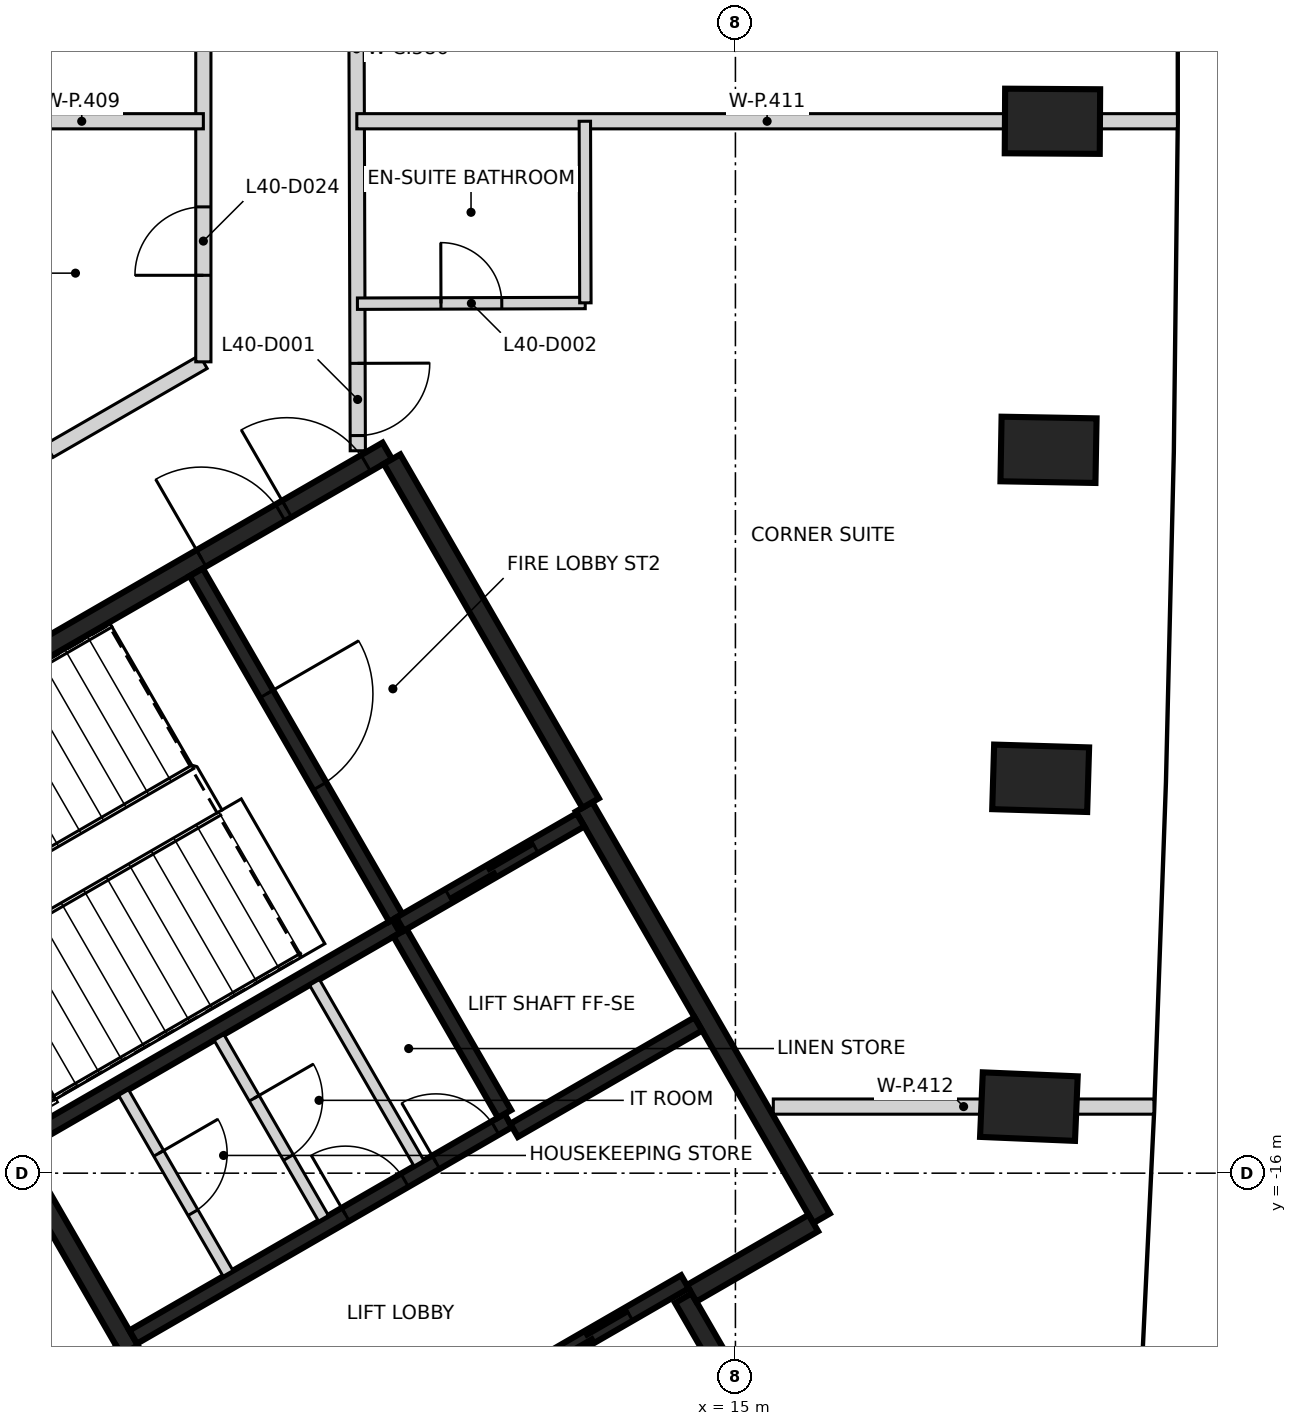
"""IFC4 building model, lengths in metres.
Left out: names, types, materials, properties, quantities, classifications, styles, units other than length and angle.
Written with IfcOpenShell. Run it as: python <this file> out.ifc"""

import sys

from ifc_helpers import new_model, si_unit, direction, frame, frame_2d, origin, origin_2d, place, context, subcontext, project, spatial, rectangle, extrude, element, fill, save


model = new_model("IFC4")
c1 = context("Model", 3, precision=1e-05, world=origin(), true_north=direction((0.0, 1.0)))
c2 = subcontext(c1, "Body", "Model", "MODEL_VIEW")
j1 = project(units=[si_unit("LENGTHUNIT", "METRE"), si_unit("PLANEANGLEUNIT", "RADIAN")], contexts=[c1])
p1 = place(None, origin())
s1 = spatial("IfcSite", under=j1, at=p1, CompositionType="ELEMENT")
p2 = place(p1, origin())
s2 = spatial("IfcBuilding", under=s1, at=p2, CompositionType="ELEMENT")
p3 = place(p2, frame((0.0, 0.0, 161.2)))
s3 = spatial("IfcBuildingStorey", under=s2, at=p3, CompositionType="ELEMENT", Elevation=161.2)
for number, where, z_axis, x_axis in (
    (1, (18.861, -15.124, -0.4), (0.0, 0.0, 1.0), (-0.999, 0.042, 0.0)),
    (2, (19.016, -10.805, -0.4), (0.0, 0.0, 1.0), (-1.0, 0.03, 0.0)),
    (3, (19.119, -6.484, -0.4), (0.0, 0.0, 1.0), (-1.0, 0.018, 0.0)),
    (4, (19.171, -2.161, -0.4), (0.0, 0.0, 1.0), (-1.0, 0.006, 0.0)),
):
    element("IfcColumn", number, at=place(p3, frame(where, z_axis=z_axis, x_axis=x_axis)), inside=s3, PredefinedType="COLUMN", context=c2, shape_type="SweptSolid", body=[
        extrude(rectangle(XDim=1.25, YDim=0.85, at=origin_2d()), origin(), (0.0, 0.0, 1.0), 2.884),
    ])
p4 = place(p3, frame((0.417, -12.273, 0.0), z_axis=(0.0, 0.0, 1.0), x_axis=(0.866021906294, 0.500006057782, 0.0)))
e5 = element("IfcWall", 5, at=p4, inside=s3, PredefinedType="SHEAR", context=c2, shape_type="SweptSolid", body=[
    extrude(rectangle(XDim=11.55, YDim=0.25, at=frame_2d((5.775, 0.0))), origin(), (0.0, 0.0, 1.0), 3.2),
])
p5 = place(p4, frame((10.025, 0.0, 0.0)))
e6 = element("IfcOpeningElement", 6, at=p5, cuts=e5, PredefinedType="OPENING", context=c2, shape_type="SweptSolid", body=[
    extrude(rectangle(XDim=1.2, YDim=2.1, at=frame_2d((0.6, 1.05))), frame((0.0, 0.135, 0.0), z_axis=(0.0, -1.0, 0.0), x_axis=(1.0, 0.0, 0.0)), (0.0, 0.0, 1.0), 0.27),
])
p6 = place(p4, frame((8.725, 0.0, 0.0)))
e7 = element("IfcOpeningElement", 7, at=p6, cuts=e5, PredefinedType="OPENING", context=c2, shape_type="SweptSolid", body=[
    extrude(rectangle(XDim=1.2, YDim=2.1, at=frame_2d((0.6, 1.05))), frame((0.0, 0.135, 0.0), z_axis=(0.0, -1.0, 0.0), x_axis=(1.0, 0.0, 0.0)), (0.0, 0.0, 1.0), 0.27),
])
p7 = place(p3, frame((13.008, -11.181, 0.0), z_axis=(0.0, 0.0, 1.0), x_axis=(0.500004234368, -0.866022959057, 0.0)))
e8 = element("IfcWall", 8, at=p7, inside=s3, PredefinedType="SHEAR", context=c2, shape_type="SweptSolid", body=[
    extrude(rectangle(XDim=6.25, YDim=0.25, at=frame_2d((3.125, 0.0))), origin(), (0.0, 0.0, 1.0), 3.2),
])
p8 = place(p3, frame((10.483, -6.606, 0.0), z_axis=(0.0, 0.0, 1.0), x_axis=(0.49999885962, -0.866026062182, 0.0)))
e9 = element("IfcWall", 9, at=p8, inside=s3, PredefinedType="SHEAR", context=c2, shape_type="SweptSolid", body=[
    extrude(rectangle(XDim=5.225, YDim=0.25, at=frame_2d((2.612, 0.0))), origin(), (0.0, 0.0, 1.0), 3.2),
])
p9 = place(p3, frame((7.031, -18.327, 0.0), z_axis=(0.0, 0.0, 1.0), x_axis=(-0.499971222258, 0.866042017984, 0.0)))
e10 = element("IfcWall", 10, at=p9, inside=s3, PredefinedType="SHEAR", context=c2, shape_type="SweptSolid", body=[
    extrude(rectangle(XDim=3.2, YDim=0.25, at=frame_2d((1.6, 0.0))), origin(), (0.0, 0.0, 1.0), 3.2),
])
p10 = place(p3, frame((14.315, -17.644, 0.0), z_axis=(0.0, 0.0, 1.0), x_axis=(0.500023226632, -0.866011993467, 0.0)))
e11 = element("IfcWall", 11, at=p10, inside=s3, PredefinedType="SHEAR", context=c2, shape_type="SweptSolid", body=[
    extrude(rectangle(XDim=2.974, YDim=0.25, at=frame_2d((1.487, 0.0))), origin(), (0.0, 0.0, 1.0), 3.2),
])
p11 = place(p3, frame((4.414, -16.276, 0.0), z_axis=(0.0, 0.0, 1.0), x_axis=(0.500003324108, -0.866023484601, 0.0)))
e12 = element("IfcWall", 12, at=p11, inside=s3, PredefinedType="SHEAR", context=c2, shape_type="SweptSolid", body=[
    extrude(rectangle(XDim=3.085, YDim=0.25, at=frame_2d((1.542, 0.0))), origin(), (0.0, 0.0, 1.0), 3.2),
])
p12 = place(p3, frame((16.025, -16.656, 0.0), z_axis=(0.0, 0.0, 1.0), x_axis=(-0.866016279763, -0.500015802937, 0.0)))
e13 = element("IfcWall", 13, at=p12, inside=s3, PredefinedType="SHEAR", context=c2, shape_type="SweptSolid", body=[
    extrude(rectangle(XDim=1.849, YDim=0.25, at=frame_2d((0.925, 0.0))), origin(), (0.0, 0.0, 1.0), 3.2),
])
p13 = place(p3, frame((6.065, -18.885, 0.0), z_axis=(0.0, 0.0, 1.0), x_axis=(0.866017078145, 0.500014420154, 0.0)))
e14 = element("IfcWall", 14, at=p13, inside=s3, PredefinedType="SHEAR", context=c2, shape_type="SweptSolid", body=[
    extrude(rectangle(XDim=0.989, YDim=0.25, at=frame_2d((0.495, 0.0))), origin(), (0.0, 0.0, 1.0), 3.2),
])
p14 = place(p3, frame((9.052, -20.48, 0.0), z_axis=(0.0, 0.0, 1.0), x_axis=(0.866030299012, 0.499991521122, 0.0)))
e15 = element("IfcWall", 15, at=p14, inside=s3, PredefinedType="SHEAR", context=c2, shape_type="SweptSolid", body=[
    extrude(rectangle(XDim=6.1, YDim=0.2, at=frame_2d((3.05, 0.0))), origin(), (0.0, 0.0, 1.0), 3.2),
])
p15 = place(p14, frame((1.0, 0.0, 0.0)))
e16 = element("IfcOpeningElement", 16, at=p15, cuts=e15, PredefinedType="OPENING", context=c2, shape_type="SweptSolid", body=[
    extrude(rectangle(XDim=1.2, YDim=2.1, at=frame_2d((0.6, 1.05))), frame((0.0, 0.11, 0.0), z_axis=(0.0, -1.0, 0.0), x_axis=(1.0, 0.0, 0.0)), (0.0, 0.0, 1.0), 0.22),
])
p16 = place(p14, frame((4.05, 0.0, 0.0)))
e17 = element("IfcOpeningElement", 17, at=p16, cuts=e15, PredefinedType="OPENING", context=c2, shape_type="SweptSolid", body=[
    extrude(rectangle(XDim=1.2, YDim=2.1, at=frame_2d((0.6, 1.05))), frame((0.0, 0.11, 0.0), z_axis=(0.0, -1.0, 0.0), x_axis=(1.0, 0.0, 0.0)), (0.0, 0.0, 1.0), 0.22),
])
p17 = place(p3, frame((10.538, -12.752, 0.0), z_axis=(0.0, 0.0, 1.0), x_axis=(-0.866038630372, -0.499977090179, 0.0)))
e18 = element("IfcWall", 18, at=p17, inside=s3, PredefinedType="SHEAR", context=c2, shape_type="SweptSolid", body=[
    extrude(rectangle(XDim=5.699, YDim=0.2, at=frame_2d((2.85, 0.0))), origin(), (0.0, 0.0, 1.0), 3.2),
])
p18 = place(p3, frame((7.077, -18.156, 0.0), z_axis=(0.0, 0.0, 1.0), x_axis=(0.866038630372, 0.499977090179, 0.0)))
e19 = element("IfcWall", 19, at=p18, inside=s3, PredefinedType="SHEAR", context=c2, shape_type="SweptSolid", body=[
    extrude(rectangle(XDim=5.699, YDim=0.2, at=frame_2d((2.85, 0.0))), origin(), (0.0, 0.0, 1.0), 3.2),
])
p19 = place(p18, frame((3.224, 0.0, 0.0)))
e20 = element("IfcOpeningElement", 20, at=p19, cuts=e19, PredefinedType="OPENING", context=c2, shape_type="SweptSolid", body=[
    extrude(rectangle(XDim=0.9, YDim=2.1, at=frame_2d((0.45, 1.05))), frame((0.0, 0.11, 0.0), z_axis=(0.0, -1.0, 0.0), x_axis=(1.0, 0.0, 0.0)), (0.0, 0.0, 1.0), 0.22),
])
p20 = place(p18, frame((4.599, 0.0, 0.0)))
e21 = element("IfcOpeningElement", 21, at=p20, cuts=e19, PredefinedType="OPENING", context=c2, shape_type="SweptSolid", body=[
    extrude(rectangle(XDim=0.9, YDim=2.1, at=frame_2d((0.45, 1.05))), frame((0.0, 0.11, 0.0), z_axis=(0.0, -1.0, 0.0), x_axis=(1.0, 0.0, 0.0)), (0.0, 0.0, 1.0), 0.22),
])
p21 = place(p3, frame((7.906, -8.094, 0.0), z_axis=(0.0, 0.0, 1.0), x_axis=(0.500024287448, -0.866011380966, 0.0)))
e22 = element("IfcWall", 22, at=p21, inside=s3, PredefinedType="SHEAR", context=c2, shape_type="SweptSolid", body=[
    extrude(rectangle(XDim=5.251, YDim=0.2, at=frame_2d((2.625, 0.0))), origin(), (0.0, 0.0, 1.0), 3.2),
])
p22 = place(p21, frame((1.849, 0.0, 0.0)))
e23 = element("IfcOpeningElement", 23, at=p22, cuts=e22, PredefinedType="OPENING", context=c2, shape_type="SweptSolid", body=[
    extrude(rectangle(XDim=1.4, YDim=2.1, at=frame_2d((0.7, 1.05))), frame((0.0, 0.11, 0.0), z_axis=(0.0, -1.0, 0.0), x_axis=(1.0, 0.0, 0.0)), (0.0, 0.0, 1.0), 0.22),
])
p23 = place(p3, frame((11.963, -15.22, 0.0), z_axis=(0.0, 0.0, 1.0), x_axis=(-0.500034990121, 0.866005201286, 0.0)))
e24 = element("IfcWall", 24, at=p23, inside=s3, PredefinedType="SHEAR", context=c2, shape_type="SweptSolid", body=[
    extrude(rectangle(XDim=2.75, YDim=0.2, at=frame_2d((1.375, 0.0))), origin(), (0.0, 0.0, 1.0), 3.2),
])
p24 = place(p3, frame((10.587, -12.723, 0.0), z_axis=(0.0, 0.0, 1.0), x_axis=(0.866037306777, 0.499979382845, 0.0)))
e25 = element("IfcWall", 25, at=p24, inside=s3, PredefinedType="SHEAR", context=c2, shape_type="SweptSolid", body=[
    extrude(rectangle(XDim=2.742, YDim=0.2, at=frame_2d((1.371, 0.0))), origin(), (0.0, 0.0, 1.0), 3.2),
])
p25 = place(p24, frame((0.743, 0.0, 0.0)))
e26 = element("IfcOpeningElement", 26, at=p25, cuts=e25, PredefinedType="OPENING", context=c2, shape_type="SweptSolid", body=[
    extrude(rectangle(XDim=1.3, YDim=2.1, at=frame_2d((0.65, 1.05))), frame((0.0, 0.11, 0.0), z_axis=(0.0, -1.0, 0.0), x_axis=(1.0, 0.0, 0.0)), (0.0, 0.0, 1.0), 0.22),
])
p26 = place(p3, frame((14.512, -14.037, 0.0), z_axis=(0.0, 0.0, 1.0), x_axis=(-0.866044696403, -0.499966582715, 0.0)))
e27 = element("IfcWall", 27, at=p26, inside=s3, PredefinedType="SHEAR", context=c2, shape_type="SweptSolid", body=[
    extrude(rectangle(XDim=2.799, YDim=0.2, at=frame_2d((1.399, 0.0))), origin(), (0.0, 0.0, 1.0), 3.2),
])
p27 = place(p3, frame((8.207, -14.214, 0.0), z_axis=(0.0, 0.0, 1.0), x_axis=(0.50002746344, -0.86600954718, 0.0)))
e28 = element("IfcWall", 28, at=p27, inside=s3, PredefinedType="PARTITIONING", context=c2, shape_type="SweptSolid", body=[
    extrude(rectangle(XDim=2.748, YDim=0.15, at=frame_2d((1.374, 0.0))), origin(), (0.0, 0.0, 1.0), 3.2),
])
p28 = place(p27, frame((0.924, 0.0, 0.0)))
e29 = element("IfcOpeningElement", 29, at=p28, cuts=e28, PredefinedType="OPENING", context=c2, shape_type="SweptSolid", body=[
    extrude(rectangle(XDim=0.9, YDim=2.1, at=frame_2d((0.45, 1.05))), frame((0.0, 0.085, 0.0), z_axis=(0.0, -1.0, 0.0), x_axis=(1.0, 0.0, 0.0)), (0.0, 0.0, 1.0), 0.17),
])
p29 = place(p3, frame((9.462, -13.489, 0.0), z_axis=(0.0, 0.0, 1.0), x_axis=(0.499988999718, -0.866031754707, 0.0)))
e30 = element("IfcWall", 30, at=p29, inside=s3, PredefinedType="PARTITIONING", context=c2, shape_type="SweptSolid", body=[
    extrude(rectangle(XDim=2.749, YDim=0.15, at=frame_2d((1.374, 0.0))), origin(), (0.0, 0.0, 1.0), 3.2),
])
p30 = place(p3, frame((6.951, -14.939, 0.0), z_axis=(0.0, 0.0, 1.0), x_axis=(0.499988999718, -0.866031754707, 0.0)))
e31 = element("IfcWall", 31, at=p30, inside=s3, PredefinedType="PARTITIONING", context=c2, shape_type="SweptSolid", body=[
    extrude(rectangle(XDim=2.749, YDim=0.15, at=frame_2d((1.374, 0.0))), origin(), (0.0, 0.0, 1.0), 3.2),
])
p31 = place(p30, frame((0.924, 0.0, 0.0)))
e32 = element("IfcOpeningElement", 32, at=p31, cuts=e31, PredefinedType="OPENING", context=c2, shape_type="SweptSolid", body=[
    extrude(rectangle(XDim=0.9, YDim=2.1, at=frame_2d((0.45, 1.05))), frame((0.0, 0.085, 0.0), z_axis=(0.0, -1.0, 0.0), x_axis=(1.0, 0.0, 0.0)), (0.0, 0.0, 1.0), 0.17),
])
p32 = place(p3, frame((5.973, -6.496, 0.0), z_axis=(0.0, 0.0, 1.0), x_axis=(0.866175166619, 0.4997405134, 0.0)))
e33 = element("IfcWall", 33, at=p32, inside=s3, PredefinedType="PARTITIONING", context=c2, shape_type="SweptSolid", body=[
    extrude(rectangle(XDim=2.341, YDim=0.2, at=frame_2d((1.17, 0.0))), origin(), (0.0, 0.0, 1.0), 3.2),
])
p33 = place(p3, frame((8.0, -5.326, 0.0), z_axis=(0.0, 0.0, 1.0), x_axis=(0.0, 1.0, 0.0)))
e34 = element("IfcWall", 34, at=p33, inside=s3, PredefinedType="PARTITIONING", context=c2, shape_type="SweptSolid", body=[
    extrude(rectangle(XDim=10.652, YDim=0.2, at=frame_2d((5.326, 0.0))), origin(), (0.0, 0.0, 1.0), 3.2),
])
p34 = place(p33, frame((1.138, 0.0, 0.0)))
e35 = element("IfcOpeningElement", 35, at=p34, cuts=e34, PredefinedType="OPENING", context=c2, shape_type="SweptSolid", body=[
    extrude(rectangle(XDim=0.9, YDim=2.1, at=frame_2d((0.45, 1.05))), frame((0.0, 0.11, 0.0), z_axis=(0.0, -1.0, 0.0), x_axis=(1.0, 0.0, 0.0)), (0.0, 0.0, 1.0), 0.22),
])
p35 = place(p33, frame((4.876, 0.0, 0.0)))
e36 = element("IfcOpeningElement", 36, at=p35, cuts=e34, PredefinedType="OPENING", context=c2, shape_type="SweptSolid", body=[
    extrude(rectangle(XDim=0.9, YDim=2.1, at=frame_2d((0.45, 1.05))), frame((0.0, 0.11, 0.0), z_axis=(0.0, -1.0, 0.0), x_axis=(1.0, 0.0, 0.0)), (0.0, 0.0, 1.0), 0.22),
])
p36 = place(p33, frame((8.614, 0.0, 0.0)))
e37 = element("IfcOpeningElement", 37, at=p36, cuts=e34, PredefinedType="OPENING", context=c2, shape_type="SweptSolid", body=[
    extrude(rectangle(XDim=0.9, YDim=2.1, at=frame_2d((0.45, 1.05))), frame((0.0, 0.11, 0.0), z_axis=(0.0, -1.0, 0.0), x_axis=(1.0, 0.0, 0.0)), (0.0, 0.0, 1.0), 0.22),
])
p37 = place(p3, frame((10.0, 4.078, 0.0), z_axis=(0.0, 0.0, 1.0), x_axis=(0.003070798941, -0.999995285086, 0.0)))
e38 = element("IfcWall", 38, at=p37, inside=s3, PredefinedType="PARTITIONING", context=c2, shape_type="SweptSolid", body=[
    extrude(rectangle(XDim=10.574, YDim=0.2, at=frame_2d((5.287, 0.0))), origin(), (0.0, 0.0, 1.0), 3.2),
])
p38 = place(p37, frame((9.424, 0.0, 0.0)))
e39 = element("IfcOpeningElement", 39, at=p38, cuts=e38, PredefinedType="OPENING", context=c2, shape_type="SweptSolid", body=[
    extrude(rectangle(XDim=0.95, YDim=2.1, at=frame_2d((0.475, 1.05))), frame((0.0, 0.11, 0.0), z_axis=(0.0, -1.0, 0.0), x_axis=(1.0, 0.0, 0.0)), (0.0, 0.0, 1.0), 0.22),
])
p39 = place(p37, frame((2.651, 0.0, 0.0)))
e40 = element("IfcOpeningElement", 40, at=p39, cuts=e38, PredefinedType="OPENING", context=c2, shape_type="SweptSolid", body=[
    extrude(rectangle(XDim=0.95, YDim=2.1, at=frame_2d((0.475, 1.05))), frame((0.0, 0.11, 0.0), z_axis=(0.0, -1.0, 0.0), x_axis=(1.0, 0.0, 0.0)), (0.0, 0.0, 1.0), 0.22),
])
p40 = place(p3, frame((4.8, -2.161, 0.0), z_axis=(0.0, 0.0, 1.0), x_axis=(1.0, 0.0, 0.0)))
e41 = element("IfcWall", 41, at=p40, inside=s3, PredefinedType="PARTITIONING", context=c2, shape_type="SweptSolid", body=[
    extrude(rectangle(XDim=3.2, YDim=0.2, at=frame_2d((1.6, 0.0))), origin(), (0.0, 0.0, 1.0), 3.2),
])
p41 = place(p3, frame((10.019, -2.161, 0.0), z_axis=(0.0, 0.0, 1.0), x_axis=(1.0, 0.0, 0.0)))
e42 = element("IfcWall", 42, at=p41, inside=s3, PredefinedType="PARTITIONING", context=c2, shape_type="SweptSolid", body=[
    extrude(rectangle(XDim=10.796, YDim=0.2, at=frame_2d((5.398, 0.0))), origin(), (0.0, 0.0, 1.0), 3.2),
])
p42 = place(p3, frame((15.498, -15.124, 0.0), z_axis=(0.0, 0.0, 1.0), x_axis=(1.0, 0.0, 0.0)))
e43 = element("IfcWall", 43, at=p42, inside=s3, PredefinedType="PARTITIONING", context=c2, shape_type="SweptSolid", body=[
    extrude(rectangle(XDim=5.008, YDim=0.2, at=frame_2d((2.504, 0.0))), origin(), (0.0, 0.0, 1.0), 3.2),
])
p43 = place(p3, frame((10.027, -4.561, 0.0), z_axis=(0.0, 0.0, 1.0), x_axis=(0.999995457159, 0.003014242926, 0.0)))
e44 = element("IfcWall", 44, at=p43, inside=s3, PredefinedType="PARTITIONING", context=c2, shape_type="SweptSolid", body=[
    extrude(rectangle(XDim=2.997, YDim=0.15, at=frame_2d((1.499, 0.0))), origin(), (0.0, 0.0, 1.0), 3.2),
])
p44 = place(p43, frame((1.099, 0.0, 0.0)))
e45 = element("IfcOpeningElement", 45, at=p44, cuts=e44, PredefinedType="OPENING", context=c2, shape_type="SweptSolid", body=[
    extrude(rectangle(XDim=0.8, YDim=2.1, at=frame_2d((0.4, 1.05))), frame((0.0, 0.085, 0.0), z_axis=(0.0, -1.0, 0.0), x_axis=(1.0, 0.0, 0.0)), (0.0, 0.0, 1.0), 0.17),
])
p45 = place(p3, frame((13.019, -2.161, 0.0), z_axis=(0.0, 0.0, 1.0), x_axis=(0.002861218617, -0.999995906706, 0.0)))
e46 = element("IfcWall", 46, at=p45, inside=s3, PredefinedType="PARTITIONING", context=c2, shape_type="SweptSolid", body=[
    extrude(rectangle(XDim=2.389, YDim=0.15, at=frame_2d((1.195, 0.0))), origin(), (0.0, 0.0, 1.0), 3.2),
])
p46 = place(p25, origin())
e47 = element("IfcDoor", 47, at=p46, inside=s3, OperationType="SLIDING_TO_RIGHT", PredefinedType="DOOR", context=c2, shape_type="SweptSolid", body=[
    extrude(rectangle(XDim=1.3, YDim=2.1, at=frame_2d((0.65, 1.05))), frame((0.0, 0.025, 0.0), z_axis=(0.0, -1.0, 0.0), x_axis=(1.0, 0.0, 0.0)), (0.0, 0.0, 1.0), 0.05),
])
fill(e26, e47)
p47 = place(p16, origin())
e48 = element("IfcDoor", 48, at=p47, inside=s3, OperationType="DOUBLE_DOOR_SLIDING", PredefinedType="DOOR", context=c2, shape_type="SweptSolid", body=[
    extrude(rectangle(XDim=1.2, YDim=2.1, at=frame_2d((0.6, 1.05))), frame((0.0, 0.025, 0.0), z_axis=(0.0, -1.0, 0.0), x_axis=(1.0, 0.0, 0.0)), (0.0, 0.0, 1.0), 0.05),
])
fill(e17, e48)
p48 = place(p5, origin())
e49 = element("IfcDoor", 49, at=p48, inside=s3, OperationType="SINGLE_SWING_LEFT", PredefinedType="DOOR", context=c2, shape_type="SweptSolid", body=[
    extrude(rectangle(XDim=1.2, YDim=2.1, at=frame_2d((0.6, 1.05))), frame((0.0, 0.025, 0.0), z_axis=(0.0, -1.0, 0.0), x_axis=(1.0, 0.0, 0.0)), (0.0, 0.0, 1.0), 0.05),
])
fill(e6, e49)
p49 = place(p6, origin())
e50 = element("IfcDoor", 50, at=p49, inside=s3, OperationType="SINGLE_SWING_RIGHT", PredefinedType="DOOR", context=c2, shape_type="SweptSolid", body=[
    extrude(rectangle(XDim=1.2, YDim=2.1, at=frame_2d((0.6, 1.05))), frame((0.0, 0.025, 0.0), z_axis=(0.0, -1.0, 0.0), x_axis=(1.0, 0.0, 0.0)), (0.0, 0.0, 1.0), 0.05),
])
fill(e7, e50)
p50 = place(p22, origin())
e51 = element("IfcDoor", 51, at=p50, inside=s3, OperationType="SINGLE_SWING_RIGHT", PredefinedType="DOOR", context=c2, shape_type="SweptSolid", body=[
    extrude(rectangle(XDim=1.4, YDim=2.1, at=frame_2d((0.7, 1.05))), frame((0.0, 0.025, 0.0), z_axis=(0.0, -1.0, 0.0), x_axis=(1.0, 0.0, 0.0)), (0.0, 0.0, 1.0), 0.05),
])
fill(e23, e51)
p51 = place(p19, origin())
e52 = element("IfcDoor", 52, at=p51, inside=s3, OperationType="SINGLE_SWING_LEFT", PredefinedType="DOOR", context=c2, shape_type="SweptSolid", body=[
    extrude(rectangle(XDim=0.9, YDim=2.1, at=frame_2d((0.45, 1.05))), frame((0.0, 0.025, 0.0), z_axis=(0.0, -1.0, 0.0), x_axis=(1.0, 0.0, 0.0)), (0.0, 0.0, 1.0), 0.05),
])
fill(e20, e52)
p52 = place(p20, origin())
e53 = element("IfcDoor", 53, at=p52, inside=s3, OperationType="SINGLE_SWING_RIGHT", PredefinedType="DOOR", context=c2, shape_type="SweptSolid", body=[
    extrude(rectangle(XDim=0.9, YDim=2.1, at=frame_2d((0.45, 1.05))), frame((0.0, 0.025, 0.0), z_axis=(0.0, -1.0, 0.0), x_axis=(1.0, 0.0, 0.0)), (0.0, 0.0, 1.0), 0.05),
])
fill(e21, e53)
p53 = place(p28, origin())
e54 = element("IfcDoor", 54, at=p53, inside=s3, OperationType="SINGLE_SWING_RIGHT", PredefinedType="DOOR", context=c2, shape_type="SweptSolid", body=[
    extrude(rectangle(XDim=0.9, YDim=2.1, at=frame_2d((0.45, 1.05))), frame((0.0, 0.025, 0.0), z_axis=(0.0, -1.0, 0.0), x_axis=(1.0, 0.0, 0.0)), (0.0, 0.0, 1.0), 0.05),
])
fill(e29, e54)
p54 = place(p31, origin())
e55 = element("IfcDoor", 55, at=p54, inside=s3, OperationType="SINGLE_SWING_LEFT", PredefinedType="DOOR", context=c2, shape_type="SweptSolid", body=[
    extrude(rectangle(XDim=0.9, YDim=2.1, at=frame_2d((0.45, 1.05))), frame((0.0, 0.025, 0.0), z_axis=(0.0, -1.0, 0.0), x_axis=(1.0, 0.0, 0.0)), (0.0, 0.0, 1.0), 0.05),
])
fill(e32, e55)
p55 = place(p38, origin())
e56 = element("IfcDoor", 56, at=p55, inside=s3, OperationType="SINGLE_SWING_LEFT", PredefinedType="DOOR", context=c2, shape_type="SweptSolid", body=[
    extrude(rectangle(XDim=0.95, YDim=2.1, at=frame_2d((0.475, 1.05))), frame((0.0, 0.025, 0.0), z_axis=(0.0, -1.0, 0.0), x_axis=(1.0, 0.0, 0.0)), (0.0, 0.0, 1.0), 0.05),
])
fill(e39, e56)
p56 = place(p44, frame((0.8, 0.0, 0.0), z_axis=(0.0, 0.0, 1.0), x_axis=(-1.0, 0.0, 0.0)))
e57 = element("IfcDoor", 57, at=p56, inside=s3, OperationType="SINGLE_SWING_LEFT", PredefinedType="DOOR", context=c2, shape_type="SweptSolid", body=[
    extrude(rectangle(XDim=0.8, YDim=2.1, at=frame_2d((0.4, 1.05))), frame((0.0, 0.025, 0.0), z_axis=(0.0, -1.0, 0.0), x_axis=(1.0, 0.0, 0.0)), (0.0, 0.0, 1.0), 0.05),
])
fill(e45, e57)
p57 = place(p34, origin())
e58 = element("IfcDoor", 58, at=p57, inside=s3, OperationType="SINGLE_SWING_LEFT", PredefinedType="DOOR", context=c2, shape_type="SweptSolid", body=[
    extrude(rectangle(XDim=0.9, YDim=2.1, at=frame_2d((0.45, 1.05))), frame((0.0, 0.025, 0.0), z_axis=(0.0, -1.0, 0.0), x_axis=(1.0, 0.0, 0.0)), (0.0, 0.0, 1.0), 0.05),
])
fill(e35, e58)
save(model, sys.argv[1])
